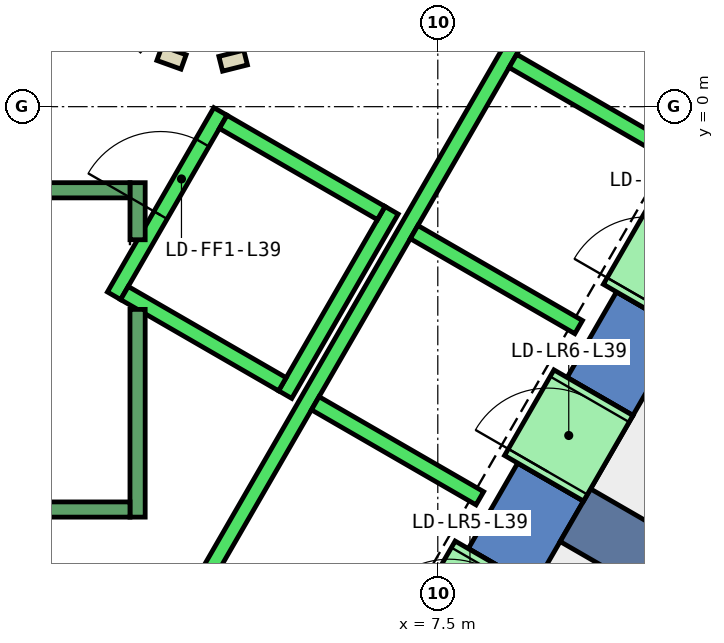
"""IFC4 building model, lengths in metres.
Left out: names, types, materials, properties, quantities, classifications, styles, units other than length and angle.
Written with IfcOpenShell. Run it as: python <this file> out.ifc"""

import sys

from ifc_helpers import new_model, si_unit, direction, frame, frame_2d, origin, place, context, subcontext, project, spatial, polyline, rectangle, outline, extrude, element, fill, save


model = new_model("IFC4")
c1 = context("Model", 3, precision=1e-05, world=origin(), true_north=direction((0.0, 1.0)))
c2 = subcontext(c1, "Body", "Model", "MODEL_VIEW")
j1 = project(units=[si_unit("LENGTHUNIT", "METRE"), si_unit("PLANEANGLEUNIT", "RADIAN")], contexts=[c1])
p1 = place(None, origin())
s1 = spatial("IfcSite", under=j1, at=p1, CompositionType="ELEMENT")
p2 = place(p1, origin())
s2 = spatial("IfcBuilding", under=s1, at=p2, CompositionType="ELEMENT")
p3 = place(p2, frame((0.0, 0.0, 176.0)))
s3 = spatial("IfcBuildingStorey", under=s2, at=p3, CompositionType="ELEMENT", Elevation=176.0)
p4 = place(p3, frame((0.0, 0.0, -0.4)))
e1 = element("IfcWall", 1, at=p4, inside=s3, PredefinedType="SHEAR", context=c2, shape_type="SweptSolid", body=[
    extrude(outline(polyline([(9.417, -5.189), (8.551, -4.689), (7.902, -5.814), (8.767, -6.314), (9.417, -5.189)])), origin(), (0.0, 0.0, 1.0), 4.2),
])
p5 = place(p3, frame((0.0, 0.0, -0.4)))
e2 = element("IfcWall", 2, at=p5, inside=s3, PredefinedType="SHEAR", context=c2, shape_type="SweptSolid", body=[
    extrude(outline(polyline([(10.717, -2.937), (9.851, -2.437), (9.201, -3.563), (10.067, -4.063), (10.717, -2.937)])), origin(), (0.0, 0.0, 1.0), 4.2),
])
p6 = place(p3, frame((0.0, 0.0, 3.6)))
e3 = element("IfcWall", 3, at=p6, inside=s3, PredefinedType="SHEAR", context=c2, shape_type="SweptSolid", body=[
    extrude(outline(polyline([(8.767, -6.314), (7.902, -5.814), (7.252, -6.94), (8.117, -7.44), (8.767, -6.314)])), origin(), (0.0, 0.0, 1.0), 0.2),
])
p7 = place(p3, frame((0.0, 0.0, 3.6)))
e4 = element("IfcWall", 4, at=p7, inside=s3, PredefinedType="SHEAR", context=c2, shape_type="SweptSolid", body=[
    extrude(outline(polyline([(10.067, -4.063), (9.201, -3.563), (8.551, -4.689), (9.417, -5.189), (10.067, -4.063)])), origin(), (0.0, 0.0, 1.0), 0.2),
])
p8 = place(p3, frame((0.0, 0.0, 3.6)))
e5 = element("IfcWall", 5, at=p8, inside=s3, PredefinedType="SHEAR", context=c2, shape_type="SweptSolid", body=[
    extrude(outline(polyline([(11.367, -1.811), (10.501, -1.311), (9.851, -2.437), (10.717, -2.937), (11.367, -1.811)])), origin(), (0.0, 0.0, 1.0), 0.2),
])
p9 = place(p3, frame((9.31, -5.375, -0.4), z_axis=(0.0, 0.0, 1.0), x_axis=(0.866017533419, -0.500013631625, 0.0)))
e6 = element("IfcWall", 6, at=p9, inside=s3, PredefinedType="SHEAR", context=c2, shape_type="SweptSolid", body=[
    extrude(rectangle(XDim=9.0, YDim=0.8, at=frame_2d((4.5, 0.0))), origin(), (0.0, 0.0, 1.0), 4.2),
])
p10 = place(p3, frame((3.838, 0.702, 0.0), z_axis=(0.0, 0.0, 1.0), x_axis=(0.941035081519, -0.338308993895, 0.0)))
e7 = element("IfcWall", 7, at=p10, inside=s3, PredefinedType="PARTITIONING", context=c2, shape_type="SweptSolid", body=[
    extrude(rectangle(XDim=0.337, YDim=0.2, at=frame_2d((0.168, 0.0))), origin(), (0.0, 0.0, 1.0), 3.75),
])
p11 = place(p3, frame((4.644, 0.564, 0.0), z_axis=(0.0, 0.0, 1.0), x_axis=(0.969929076366, 0.243387729394, 0.0)))
e8 = element("IfcWall", 8, at=p11, inside=s3, PredefinedType="PARTITIONING", context=c2, shape_type="SweptSolid", body=[
    extrude(rectangle(XDim=0.337, YDim=0.2, at=frame_2d((0.168, 0.0))), origin(), (0.0, 0.0, 1.0), 3.75),
])
p12 = place(p3, frame((3.24, -2.488, 0.0), z_axis=(0.0, 0.0, 1.0), x_axis=(0.49994636267, 0.866056369097, 0.0)))
e9 = element("IfcWall", 9, at=p12, inside=s3, PredefinedType="STANDARD", context=c2, shape_type="SweptSolid", body=[
    extrude(rectangle(XDim=2.8, YDim=0.2, at=frame_2d((1.4, 0.0))), origin(), (0.0, 0.0, 1.0), 3.75),
])
p13 = place(p12, frame((1.225, 0.0, 0.0)))
e10 = element("IfcOpeningElement", 10, at=p13, cuts=e9, PredefinedType="OPENING", context=c2, shape_type="SweptSolid", body=[
    extrude(rectangle(XDim=1.1, YDim=2.1, at=frame_2d((0.55, 1.05))), frame((0.0, 0.11, 0.0), z_axis=(0.0, -1.0, 0.0), x_axis=(1.0, 0.0, 0.0)), (0.0, 0.0, 1.0), 0.22),
])
p14 = place(p3, frame((5.492, -3.788, 0.0), z_axis=(0.0, 0.0, 1.0), x_axis=(0.500011755427, 0.866018616679, 0.0)))
e11 = element("IfcWall", 11, at=p14, inside=s3, PredefinedType="STANDARD", context=c2, shape_type="SweptSolid", body=[
    extrude(rectangle(XDim=2.8, YDim=0.2, at=frame_2d((1.4, 0.0))), origin(), (0.0, 0.0, 1.0), 3.75),
])
p15 = place(p3, frame((3.377, -2.452, 0.0), z_axis=(0.0, 0.0, 1.0), x_axis=(0.865955154139, -0.50012165622, 0.0)))
e12 = element("IfcWall", 12, at=p15, inside=s3, PredefinedType="STANDARD", context=c2, shape_type="SweptSolid", body=[
    extrude(rectangle(XDim=2.4, YDim=0.2, at=frame_2d((1.2, 0.0))), origin(), (0.0, 0.0, 1.0), 3.75),
])
p16 = place(p3, frame((4.677, -0.2, 0.0), z_axis=(0.0, 0.0, 1.0), x_axis=(0.865973769406, -0.500089422704, 0.0)))
e13 = element("IfcWall", 13, at=p16, inside=s3, PredefinedType="STANDARD", context=c2, shape_type="SweptSolid", body=[
    extrude(rectangle(XDim=2.399, YDim=0.2, at=frame_2d((1.2, 0.0))), origin(), (0.0, 0.0, 1.0), 3.75),
])
p17 = place(p3, frame((4.451, -6.19, 0.0), z_axis=(0.0, 0.0, 1.0), x_axis=(0.50000090737, 0.866024879913, 0.0)))
e14 = element("IfcWall", 14, at=p17, inside=s3, PredefinedType="STANDARD", context=c2, shape_type="SweptSolid", body=[
    extrude(rectangle(XDim=10.6, YDim=0.2, at=frame_2d((5.3, 0.0))), origin(), (0.0, 0.0, 1.0), 3.75),
])
for number, where, z_axis, x_axis in (
    (15, (5.888, -3.902, 0.0), (0.0, 0.0, 1.0), (0.866, -0.5, 0.0)),
    (16, (7.188, -1.65, 0.0), (0.0, 0.0, 1.0), (0.866, -0.5, 0.0)),
    (17, (8.488, 0.602, 0.0), (0.0, 0.0, 1.0), (0.866, -0.5, 0.0)),
):
    element("IfcWall", number, at=place(p3, frame(where, z_axis=z_axis, x_axis=x_axis)), inside=s3, PredefinedType="STANDARD", context=c2, shape_type="SweptSolid", body=[
        extrude(rectangle(XDim=2.5, YDim=0.2, at=frame_2d((1.25, 0.0))), origin(), (0.0, 0.0, 1.0), 3.75),
    ])
p18 = place(p3, frame((7.598, -7.14, 0.0), z_axis=(0.0, 0.0, 1.0), x_axis=(0.500362116554, 0.865816234728, 0.0)))
e18 = element("IfcWall", 18, at=p18, inside=s3, PredefinedType="STANDARD", context=c2, shape_type="SweptSolid", body=[
    extrude(rectangle(XDim=1.299, YDim=1.2, at=frame_2d((0.65, 0.0))), origin(), (0.0, 0.0, 1.0), 2.4),
])
p19 = place(p18, frame((0.1, 0.0, 0.0)))
e19 = element("IfcOpeningElement", 19, at=p19, cuts=e18, PredefinedType="OPENING", context=c2, shape_type="SweptSolid", body=[
    extrude(rectangle(XDim=1.1, YDim=2.3, at=frame_2d((0.55, 1.15))), frame((0.0, 0.61, 0.0), z_axis=(0.0, -1.0, 0.0), x_axis=(1.0, 0.0, 0.0)), (0.0, 0.0, 1.0), 1.22),
])
p20 = place(p3, frame((8.898, -4.889, 0.0), z_axis=(0.0, 0.0, 1.0), x_axis=(0.500036693733, 0.866004217611, 0.0)))
e20 = element("IfcWall", 20, at=p20, inside=s3, PredefinedType="STANDARD", context=c2, shape_type="SweptSolid", body=[
    extrude(rectangle(XDim=1.3, YDim=1.2, at=frame_2d((0.65, 0.0))), origin(), (0.0, 0.0, 1.0), 2.4),
])
p21 = place(p20, frame((0.1, 0.0, 0.0)))
e21 = element("IfcOpeningElement", 21, at=p21, cuts=e20, PredefinedType="OPENING", context=c2, shape_type="SweptSolid", body=[
    extrude(rectangle(XDim=1.1, YDim=2.3, at=frame_2d((0.55, 1.15))), frame((0.0, 0.61, 0.0), z_axis=(0.0, -1.0, 0.0), x_axis=(1.0, 0.0, 0.0)), (0.0, 0.0, 1.0), 1.22),
])
p22 = place(p3, frame((10.198, -2.637, 0.0), z_axis=(0.0, 0.0, 1.0), x_axis=(0.49989585183, 0.866085525409, 0.0)))
e22 = element("IfcWall", 22, at=p22, inside=s3, PredefinedType="STANDARD", context=c2, shape_type="SweptSolid", body=[
    extrude(rectangle(XDim=1.3, YDim=1.2, at=frame_2d((0.65, 0.0))), origin(), (0.0, 0.0, 1.0), 2.4),
])
p23 = place(p22, frame((0.1, 0.0, 0.0)))
e23 = element("IfcOpeningElement", 23, at=p23, cuts=e22, PredefinedType="OPENING", context=c2, shape_type="SweptSolid", body=[
    extrude(rectangle(XDim=1.1, YDim=2.3, at=frame_2d((0.55, 1.15))), frame((0.0, 0.61, 0.0), z_axis=(0.0, -1.0, 0.0), x_axis=(1.0, 0.0, 0.0)), (0.0, 0.0, 1.0), 1.22),
])
p24 = place(p3, frame((3.55, -2.667, 0.0), z_axis=(0.0, 0.0, 1.0), x_axis=(0.0, -1.0, 0.0)))
e24 = element("IfcWall", 24, at=p24, inside=s3, PredefinedType="STANDARD", context=c2, shape_type="SweptSolid", body=[
    extrude(rectangle(XDim=2.733, YDim=0.2, at=frame_2d((1.366, 0.0))), origin(), (0.0, 0.0, 1.0), 3.75),
])
p25 = place(p3, frame((3.55, -1.0, 0.0), z_axis=(0.0, 0.0, 1.0), x_axis=(0.0, -1.0, 0.0)))
e25 = element("IfcWall", 25, at=p25, inside=s3, PredefinedType="STANDARD", context=c2, shape_type="SweptSolid", body=[
    extrude(rectangle(XDim=0.751, YDim=0.2, at=frame_2d((0.375, 0.0))), origin(), (0.0, 0.0, 1.0), 3.75),
])
p26 = place(p3, frame((-3.45, -1.1, 0.0), z_axis=(0.0, 0.0, 1.0), x_axis=(1.0, 0.0, 0.0)))
e26 = element("IfcWall", 26, at=p26, inside=s3, PredefinedType="STANDARD", context=c2, shape_type="SweptSolid", body=[
    extrude(rectangle(XDim=6.9, YDim=0.2, at=frame_2d((3.45, 0.0))), origin(), (0.0, 0.0, 1.0), 3.75),
])
p27 = place(p26, frame((0.45, 0.0, 0.0)))
e27 = element("IfcOpeningElement", 27, at=p27, cuts=e26, PredefinedType="OPENING", context=c2, shape_type="SweptSolid", body=[
    extrude(rectangle(XDim=1.1, YDim=2.2, at=frame_2d((0.55, 1.1))), frame((0.0, 0.11, 0.0), z_axis=(0.0, -1.0, 0.0), x_axis=(1.0, 0.0, 0.0)), (0.0, 0.0, 1.0), 0.22),
])
p28 = place(p3, frame((-3.45, -5.3, 0.0), z_axis=(0.0, 0.0, 1.0), x_axis=(1.0, 0.0, 0.0)))
e28 = element("IfcWall", 28, at=p28, inside=s3, PredefinedType="STANDARD", context=c2, shape_type="SweptSolid", body=[
    extrude(rectangle(XDim=6.9, YDim=0.2, at=frame_2d((3.45, 0.0))), origin(), (0.0, 0.0, 1.0), 3.75),
])
p29 = place(p21, origin())
e29 = element("IfcDoor", 29, at=p29, inside=s3, OperationType="SLIDING_TO_LEFT", PredefinedType="DOOR", context=c2, shape_type="SweptSolid", body=[
    extrude(rectangle(XDim=1.1, YDim=2.3, at=frame_2d((0.55, 1.15))), frame((0.0, 0.025, 0.0), z_axis=(0.0, -1.0, 0.0), x_axis=(1.0, 0.0, 0.0)), (0.0, 0.0, 1.0), 0.05),
])
fill(e21, e29)
p30 = place(p13, origin())
e30 = element("IfcDoor", 30, at=p30, inside=s3, OperationType="SLIDING_TO_LEFT", PredefinedType="DOOR", context=c2, shape_type="SweptSolid", body=[
    extrude(rectangle(XDim=1.1, YDim=2.1, at=frame_2d((0.55, 1.05))), frame((0.0, 0.025, 0.0), z_axis=(0.0, -1.0, 0.0), x_axis=(1.0, 0.0, 0.0)), (0.0, 0.0, 1.0), 0.05),
])
fill(e10, e30)
save(model, sys.argv[1])
